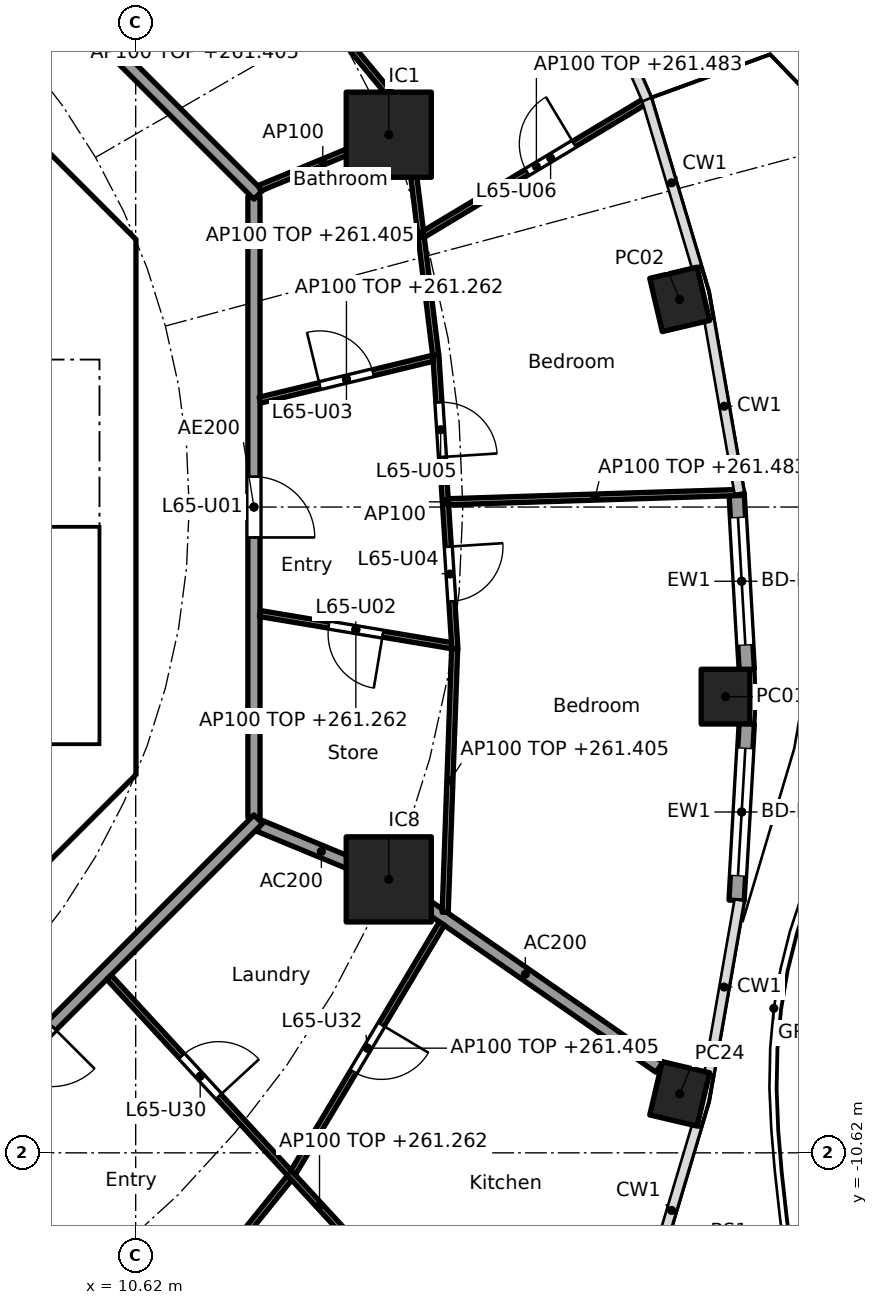
"""IFC4 building model, lengths in metres.
Left out: names, types, materials, properties, quantities, classifications, styles, units other than length and angle.
Written with IfcOpenShell. Run it as: python <this file> out.ifc"""

import sys

from ifc_helpers import new_model, si_unit, direction, frame, frame_2d, origin, origin_2d, place, context, subcontext, project, spatial, polyline, rectangle, hollow_rectangle, outline, extrude, element, fill, save


model = new_model("IFC4")
c1 = context("Model", 3, precision=1e-05, world=origin(), true_north=direction((0.0, 1.0)))
c2 = subcontext(c1, "Body", "Model", "MODEL_VIEW")
j1 = project(units=[si_unit("LENGTHUNIT", "METRE"), si_unit("PLANEANGLEUNIT", "RADIAN")], contexts=[c1])
p1 = place(None, origin())
s1 = spatial("IfcSite", under=j1, at=p1, CompositionType="ELEMENT")
p2 = place(p1, origin())
s2 = spatial("IfcBuilding", under=s1, at=p2, CompositionType="ELEMENT")
p3 = place(p2, frame((0.0, 0.0, 258.5)))
s3 = spatial("IfcBuildingStorey", under=s2, at=p3, CompositionType="ELEMENT", Elevation=258.5)
for number, where, z_axis, x_axis in (
    (1, (20.32, -3.118, -0.26), (0.0, 0.0, 1.0), (0.0, 1.0, 0.0)),
    (2, (19.566, 3.415, -0.26), (0.0, 0.0, 1.0), (-0.229, 0.973, 0.0)),
    (3, (19.566, -9.65, -0.26), (0.0, 0.0, 1.0), (0.229, 0.973, 0.0)),
):
    element("IfcColumn", number, at=place(p3, frame(where, z_axis=z_axis, x_axis=x_axis)), inside=s3, PredefinedType="COLUMN", context=c2, shape_type="SweptSolid", body=[
        extrude(hollow_rectangle(XDim=0.9, YDim=0.8, WallThickness=0.028, at=origin_2d()), origin(), (0.0, 0.0, 1.0), 3.96),
    ])
for number, where, z_axis, x_axis in (
    (4, (14.782, 6.123, 0.0), (0.0, 0.0, 1.0), (1.0, 0.0, 0.0)),
    (5, (14.782, -6.123, 0.0), (0.0, 0.0, 1.0), (1.0, 0.0, 0.0)),
):
    element("IfcColumn", number, at=place(p3, frame(where, z_axis=z_axis, x_axis=x_axis)), inside=s3, PredefinedType="COLUMN", context=c2, shape_type="SweptSolid", body=[
        extrude(rectangle(XDim=1.4, YDim=1.4, at=origin_2d()), origin(), (0.0, 0.0, 1.0), 3.7),
    ])
p4 = place(p3, frame((20.502, 0.235, 0.0), z_axis=(0.0, 0.0, 1.0), x_axis=(0.057533933376, -0.998343551344, 0.0)))
e6 = element("IfcWall", 6, at=p4, inside=s3, PredefinedType="SOLIDWALL", context=c2, shape_type="SweptSolid", body=[
    extrude(rectangle(XDim=2.915, YDim=0.25, at=frame_2d((1.458, 0.0))), origin(), (0.0, 0.0, 1.0), 3.44),
])
p5 = place(p4, frame((0.408, 0.0, 0.0)))
e7 = element("IfcOpeningElement", 7, at=p5, cuts=e6, PredefinedType="OPENING", context=c2, shape_type="SweptSolid", body=[
    extrude(rectangle(XDim=2.1, YDim=2.4, at=frame_2d((1.05, 1.2))), frame((0.0, 0.135, 0.0), z_axis=(0.0, -1.0, 0.0), x_axis=(1.0, 0.0, 0.0)), (0.0, 0.0, 1.0), 0.27),
])
p6 = place(p3, frame((20.669, -3.56, 0.0), z_axis=(0.0, 0.0, 1.0), x_axis=(-0.057533933376, -0.998343551344, 0.0)))
e8 = element("IfcWall", 8, at=p6, inside=s3, PredefinedType="SOLIDWALL", context=c2, shape_type="SweptSolid", body=[
    extrude(rectangle(XDim=2.915, YDim=0.25, at=frame_2d((1.458, 0.0))), origin(), (0.0, 0.0, 1.0), 3.44),
])
p7 = place(p6, frame((0.408, 0.0, 0.0)))
e9 = element("IfcOpeningElement", 9, at=p7, cuts=e8, PredefinedType="OPENING", context=c2, shape_type="SweptSolid", body=[
    extrude(rectangle(XDim=2.1, YDim=2.4, at=frame_2d((1.05, 1.2))), frame((0.0, 0.135, 0.0), z_axis=(0.0, -1.0, 0.0), x_axis=(1.0, 0.0, 0.0)), (0.0, 0.0, 1.0), 0.27),
])
p8 = place(p3, frame((9.988, 4.613, 0.0), z_axis=(0.0, 0.0, 1.0), x_axis=(-0.707106781187, 0.707106781187, 0.0)))
e10 = element("IfcWall", 10, at=p8, inside=s3, PredefinedType="SHEAR", context=c2, shape_type="SweptSolid", body=[
    extrude(rectangle(XDim=7.602, YDim=0.6, at=frame_2d((3.801, 0.0))), origin(), (0.0, 0.0, 1.0), 3.44),
])
p9 = place(p8, frame((3.201, 0.0, 0.0)))
e11 = element("IfcOpeningElement", 11, at=p9, cuts=e10, PredefinedType="OPENING", context=c2, shape_type="SweptSolid", body=[
    extrude(rectangle(XDim=1.2, YDim=2.1, at=frame_2d((0.6, 1.05))), frame((0.0, 0.31, 0.0), z_axis=(0.0, -1.0, 0.0), x_axis=(1.0, 0.0, 0.0)), (0.0, 0.0, 1.0), 0.62),
])
p10 = place(p3, frame((4.613, -9.988, 0.0), z_axis=(0.0, 0.0, 1.0), x_axis=(0.707106781187, 0.707106781187, 0.0)))
e12 = element("IfcWall", 12, at=p10, inside=s3, PredefinedType="SHEAR", context=c2, shape_type="SweptSolid", body=[
    extrude(rectangle(XDim=7.602, YDim=0.6, at=frame_2d((3.801, 0.0))), origin(), (0.0, 0.0, 1.0), 3.44),
])
p11 = place(p10, frame((3.201, 0.0, 0.0)))
e13 = element("IfcOpeningElement", 13, at=p11, cuts=e12, PredefinedType="OPENING", context=c2, shape_type="SweptSolid", body=[
    extrude(rectangle(XDim=1.2, YDim=2.1, at=frame_2d((0.6, 1.05))), frame((0.0, 0.31, 0.0), z_axis=(0.0, -1.0, 0.0), x_axis=(1.0, 0.0, 0.0)), (0.0, 0.0, 1.0), 0.62),
])
p12 = place(p3, frame((6.7, 4.0, 0.0), z_axis=(0.0, 0.0, 1.0), x_axis=(1.0, 0.0, 0.0)))
e14 = element("IfcWall", 14, at=p12, inside=s3, PredefinedType="SOLIDWALL", context=c2, shape_type="SweptSolid", body=[
    extrude(rectangle(XDim=3.325, YDim=0.2, at=frame_2d((1.662, 0.0))), origin(), (0.0, 0.0, 1.0), 3.44),
])
p13 = place(p12, frame((1.25, 0.0, 0.0)))
e15 = element("IfcOpeningElement", 15, at=p13, cuts=e14, PredefinedType="OPENING", context=c2, shape_type="SweptSolid", body=[
    extrude(rectangle(XDim=1.1, YDim=2.1, at=frame_2d((0.55, 1.05))), frame((0.0, 0.11, 0.0), z_axis=(0.0, -1.0, 0.0), x_axis=(1.0, 0.0, 0.0)), (0.0, 0.0, 1.0), 0.22),
])
p14 = place(p3, origin())
e16 = element("IfcWall", 16, at=p14, inside=s3, PredefinedType="SHEAR", context=c2, shape_type="SweptSolid", body=[
    extrude(outline(polyline([(9.776, -4.401), (10.025, -4.152), (10.025, -3.801), (10.025, 4.152), (9.776, 4.401), (10.2, 4.825), (10.625, 4.401), (10.625, -4.401), (10.2, -4.825), (9.776, -4.401)])), origin(), (0.0, 0.0, 1.0), 3.44),
])
p15 = place(p3, origin())
e17 = element("IfcWall", 17, at=p15, inside=s3, PredefinedType="SOLIDWALL", context=c2, shape_type="SweptSolid", body=[
    extrude(outline(polyline([(10.025, -4.1), (6.7, -4.1), (6.7, -3.9), (10.025, -3.9), (10.025, -4.1)])), origin(), (0.0, 0.0, 1.0), 3.44),
])
p16 = place(p3, frame((12.657, -5.243, 0.0), z_axis=(0.0, 0.0, 1.0), x_axis=(0.92383017907, -0.382802560388, 0.0)))
e18 = element("IfcWall", 18, at=p16, inside=s3, PredefinedType="PARTITIONING", context=c2, shape_type="SweptSolid", body=[
    extrude(rectangle(XDim=2.2, YDim=0.2, at=frame_2d((1.1, 0.0))), origin(), (0.0, 0.0, 1.0), 3.44),
])
p17 = place(p3, frame((14.823, -6.151, 0.0), z_axis=(0.0, 0.0, 1.0), x_axis=(0.821435065081, -0.570302054928, 0.0)))
e19 = element("IfcWall", 19, at=p17, inside=s3, PredefinedType="PARTITIONING", context=c2, shape_type="SweptSolid", body=[
    extrude(rectangle(XDim=5.368, YDim=0.2, at=frame_2d((2.684, 0.0))), origin(), (0.0, 0.0, 1.0), 3.44),
])
p18 = place(p3, frame((12.565, -5.104, 0.0), z_axis=(0.0, 0.0, 1.0), x_axis=(0.0, 1.0, 0.0)))
e20 = element("IfcWall", 20, at=p18, inside=s3, PredefinedType="PARTITIONING", context=c2, shape_type="SweptSolid", body=[
    extrude(rectangle(XDim=10.209, YDim=0.2, at=frame_2d((5.104, 0.0))), origin(), (0.0, 0.0, 1.0), 3.44),
])
p19 = place(p18, frame((4.604, 0.0, 0.0)))
e21 = element("IfcOpeningElement", 21, at=p19, cuts=e20, PredefinedType="OPENING", context=c2, shape_type="SweptSolid", body=[
    extrude(rectangle(XDim=1.0, YDim=2.1, at=frame_2d((0.5, 1.05))), frame((0.0, 0.11, 0.0), z_axis=(0.0, -1.0, 0.0), x_axis=(1.0, 0.0, 0.0)), (0.0, 0.0, 1.0), 0.22),
])
p20 = place(p3, frame((12.635, 5.134, 0.0), z_axis=(0.0, 0.0, 1.0), x_axis=(-0.707106781187, 0.707106781187, 0.0)))
e22 = element("IfcWall", 22, at=p20, inside=s3, PredefinedType="PARTITIONING", context=c2, shape_type="SweptSolid", body=[
    extrude(rectangle(XDim=10.609, YDim=0.2, at=frame_2d((5.305, 0.0))), origin(), (0.0, 0.0, 1.0), 3.44),
])
p21 = place(p3, frame((5.275, -12.494, 0.0), z_axis=(0.0, 0.0, 1.0), x_axis=(0.707106781187, 0.707106781187, 0.0)))
e23 = element("IfcWall", 23, at=p21, inside=s3, PredefinedType="PARTITIONING", context=c2, shape_type="SweptSolid", body=[
    extrude(rectangle(XDim=10.409, YDim=0.2, at=frame_2d((5.205, 0.0))), origin(), (0.0, 0.0, 1.0), 3.44),
])
p22 = place(p21, frame((4.604, 0.0, 0.0)))
e24 = element("IfcOpeningElement", 24, at=p22, cuts=e23, PredefinedType="OPENING", context=c2, shape_type="SweptSolid", body=[
    extrude(rectangle(XDim=1.0, YDim=2.1, at=frame_2d((0.5, 1.05))), frame((0.0, 0.11, 0.0), z_axis=(0.0, -1.0, 0.0), x_axis=(1.0, 0.0, 0.0)), (0.0, 0.0, 1.0), 0.22),
])
p23 = place(p3, frame((12.663, -1.751, 0.0), z_axis=(0.0, 0.0, 1.0), x_axis=(0.98626156497, -0.165191178529, 0.0)))
e25 = element("IfcWall", 25, at=p23, inside=s3, PredefinedType="PARTITIONING", context=c2, shape_type="SweptSolid", body=[
    extrude(rectangle(XDim=3.198, YDim=0.1, at=frame_2d((1.599, 0.0))), origin(), (0.0, 0.0, 1.0), 2.762),
])
p24 = place(p23, frame((1.149, 0.0, 0.0)))
e26 = element("IfcOpeningElement", 26, at=p24, cuts=e25, PredefinedType="OPENING", context=c2, shape_type="SweptSolid", body=[
    extrude(rectangle(XDim=0.9, YDim=2.1, at=frame_2d((0.45, 1.05))), frame((0.0, 0.06, 0.0), z_axis=(0.0, -1.0, 0.0), x_axis=(1.0, 0.0, 0.0)), (0.0, 0.0, 1.0), 0.12),
])
p25 = place(p3, frame((15.87, -2.338, 0.0), z_axis=(0.0, 0.0, 1.0), x_axis=(-0.064797294757, 0.997898447034, 0.0)))
e27 = element("IfcWall", 27, at=p25, inside=s3, PredefinedType="PARTITIONING", context=c2, shape_type="SweptSolid", body=[
    extrude(rectangle(XDim=4.857, YDim=0.1, at=frame_2d((2.428, 0.0))), origin(), (0.0, 0.0, 1.0), 3.44),
])
p26 = place(p25, frame((0.789, 0.0, 0.0)))
e28 = element("IfcOpeningElement", 28, at=p26, cuts=e27, PredefinedType="OPENING", context=c2, shape_type="SweptSolid", body=[
    extrude(rectangle(XDim=0.9, YDim=2.1, at=frame_2d((0.45, 1.05))), frame((0.0, 0.06, 0.0), z_axis=(0.0, -1.0, 0.0), x_axis=(1.0, 0.0, 0.0)), (0.0, 0.0, 1.0), 0.12),
])
p27 = place(p25, frame((3.167, 0.0, 0.0)))
e29 = element("IfcOpeningElement", 29, at=p27, cuts=e27, PredefinedType="OPENING", context=c2, shape_type="SweptSolid", body=[
    extrude(rectangle(XDim=0.9, YDim=2.1, at=frame_2d((0.45, 1.05))), frame((0.0, 0.06, 0.0), z_axis=(0.0, -1.0, 0.0), x_axis=(1.0, 0.0, 0.0)), (0.0, 0.0, 1.0), 0.12),
])
p28 = place(p3, frame((15.865, -2.338, 0.0), z_axis=(0.0, 0.0, 1.0), x_axis=(-0.035864509465, -0.999356661538, 0.0)))
e30 = element("IfcWall", 30, at=p28, inside=s3, PredefinedType="PARTITIONING", context=c2, shape_type="SweptSolid", body=[
    extrude(rectangle(XDim=4.329, YDim=0.1, at=frame_2d((2.165, 0.0))), origin(), (0.0, 0.0, 1.0), 2.905),
])
p29 = place(p3, frame((15.763, 0.087, 0.0), z_axis=(0.0, 0.0, 1.0), x_axis=(0.999492034598, 0.03186962151, 0.0)))
e31 = element("IfcWall", 31, at=p29, inside=s3, PredefinedType="PARTITIONING", context=c2, shape_type="SweptSolid", body=[
    extrude(rectangle(XDim=4.826, YDim=0.1, at=frame_2d((2.413, 0.0))), origin(), (0.0, 0.0, 1.0), 2.983),
])
p30 = place(p3, frame((12.662, 1.758, 0.0), z_axis=(0.0, 0.0, 1.0), x_axis=(0.972004827836, 0.234960879007, 0.0)))
e32 = element("IfcWall", 32, at=p30, inside=s3, PredefinedType="PARTITIONING", context=c2, shape_type="SweptSolid", body=[
    extrude(rectangle(XDim=2.93, YDim=0.1, at=frame_2d((1.465, 0.0))), origin(), (0.0, 0.0, 1.0), 2.762),
])
p31 = place(p30, frame((1.015, 0.0, 0.0)))
e33 = element("IfcOpeningElement", 33, at=p31, cuts=e32, PredefinedType="OPENING", context=c2, shape_type="SweptSolid", body=[
    extrude(rectangle(XDim=0.9, YDim=2.1, at=frame_2d((0.45, 1.05))), frame((0.0, 0.06, 0.0), z_axis=(0.0, -1.0, 0.0), x_axis=(1.0, 0.0, 0.0)), (0.0, 0.0, 1.0), 0.12),
])
p32 = place(p3, frame((15.552, 2.508, 0.0), z_axis=(0.0, 0.0, 1.0), x_axis=(-0.12196631785, 0.992534239868, 0.0)))
e34 = element("IfcWall", 34, at=p32, inside=s3, PredefinedType="PARTITIONING", context=c2, shape_type="SweptSolid", body=[
    extrude(rectangle(XDim=3.937, YDim=0.1, at=frame_2d((1.969, 0.0))), origin(), (0.0, 0.0, 1.0), 2.905),
])
p33 = place(p3, frame((15.355, 4.488, 0.0), z_axis=(0.0, 0.0, 1.0), x_axis=(0.85763237524, 0.514263268123, 0.0)))
e35 = element("IfcWall", 35, at=p33, inside=s3, PredefinedType="PARTITIONING", context=c2, shape_type="SweptSolid", body=[
    extrude(rectangle(XDim=4.324, YDim=0.1, at=frame_2d((2.162, 0.0))), origin(), (0.0, 0.0, 1.0), 2.983),
])
p34 = place(p33, frame((1.985, 0.0, 0.0)))
e36 = element("IfcOpeningElement", 36, at=p34, cuts=e35, PredefinedType="OPENING", context=c2, shape_type="SweptSolid", body=[
    extrude(rectangle(XDim=0.9, YDim=2.1, at=frame_2d((0.45, 1.05))), frame((0.0, 0.06, 0.0), z_axis=(0.0, -1.0, 0.0), x_axis=(1.0, 0.0, 0.0)), (0.0, 0.0, 1.0), 0.12),
])
p35 = place(p3, frame((12.657, 5.243, 0.0), z_axis=(0.0, 0.0, 1.0), x_axis=(0.923864733477, 0.382719158442, 0.0)))
e37 = element("IfcWall", 37, at=p35, inside=s3, PredefinedType="PARTITIONING", context=c2, shape_type="SweptSolid", body=[
    extrude(rectangle(XDim=2.25, YDim=0.1, at=frame_2d((1.125, 0.0))), origin(), (0.0, 0.0, 1.0), 3.44),
])
p36 = place(p3, frame((15.098, 6.427, 0.0), z_axis=(0.0, 0.0, 1.0), x_axis=(-0.637936555536, 0.770088924158, 0.0)))
e38 = element("IfcWall", 38, at=p36, inside=s3, PredefinedType="PARTITIONING", context=c2, shape_type="SweptSolid", body=[
    extrude(rectangle(XDim=6.46, YDim=0.1, at=frame_2d((3.23, 0.0))), origin(), (0.0, 0.0, 1.0), 2.905),
])
p37 = place(p36, frame((2.78, 0.0, 0.0)))
e39 = element("IfcOpeningElement", 39, at=p37, cuts=e38, PredefinedType="OPENING", context=c2, shape_type="SweptSolid", body=[
    extrude(rectangle(XDim=0.9, YDim=2.1, at=frame_2d((0.45, 1.05))), frame((0.0, 0.06, 0.0), z_axis=(0.0, -1.0, 0.0), x_axis=(1.0, 0.0, 0.0)), (0.0, 0.0, 1.0), 0.12),
])
p38 = place(p3, frame((7.708, -10.198, 0.0), z_axis=(0.0, 0.0, 1.0), x_axis=(0.503838537732, -0.863797851292, 0.0)))
e40 = element("IfcWall", 40, at=p38, inside=s3, PredefinedType="PARTITIONING", context=c2, shape_type="SweptSolid", body=[
    extrude(rectangle(XDim=5.14, YDim=0.1, at=frame_2d((2.57, 0.0))), origin(), (0.0, 0.0, 1.0), 2.762),
])
p39 = place(p38, frame((2.095, 0.0, 0.0)))
e41 = element("IfcOpeningElement", 41, at=p39, cuts=e40, PredefinedType="OPENING", context=c2, shape_type="SweptSolid", body=[
    extrude(rectangle(XDim=0.9, YDim=2.1, at=frame_2d((0.45, 1.05))), frame((0.0, 0.06, 0.0), z_axis=(0.0, -1.0, 0.0), x_axis=(1.0, 0.0, 0.0)), (0.0, 0.0, 1.0), 0.12),
])
p40 = place(p3, frame((10.304, -14.555, 0.0), z_axis=(0.0, 0.0, 1.0), x_axis=(0.628170338674, 0.778075848237, 0.0)))
e42 = element("IfcWall", 42, at=p40, inside=s3, PredefinedType="PARTITIONING", context=c2, shape_type="SweptSolid", body=[
    extrude(rectangle(XDim=4.532, YDim=0.1, at=frame_2d((2.266, 0.0))), origin(), (0.0, 0.0, 1.0), 2.905),
])
p41 = place(p40, frame((1.816, 0.0, 0.0)))
e43 = element("IfcOpeningElement", 43, at=p41, cuts=e42, PredefinedType="OPENING", context=c2, shape_type="SweptSolid", body=[
    extrude(rectangle(XDim=0.9, YDim=2.1, at=frame_2d((0.45, 1.05))), frame((0.0, 0.06, 0.0), z_axis=(0.0, -1.0, 0.0), x_axis=(1.0, 0.0, 0.0)), (0.0, 0.0, 1.0), 0.12),
])
p42 = place(p3, frame((10.179, -7.731, 0.0), z_axis=(0.0, 0.0, 1.0), x_axis=(0.67775318564, -0.73528947997, 0.0)))
e44 = element("IfcWall", 44, at=p42, inside=s3, PredefinedType="PARTITIONING", context=c2, shape_type="SweptSolid", body=[
    extrude(rectangle(XDim=10.222, YDim=0.1, at=frame_2d((5.111, 0.0))), origin(), (0.0, 0.0, 1.0), 2.762),
])
p43 = place(p42, frame((1.766, 0.0, 0.0)))
e45 = element("IfcOpeningElement", 45, at=p43, cuts=e44, PredefinedType="OPENING", context=c2, shape_type="SweptSolid", body=[
    extrude(rectangle(XDim=0.9, YDim=2.1, at=frame_2d((0.45, 1.05))), frame((0.0, 0.06, 0.0), z_axis=(0.0, -1.0, 0.0), x_axis=(1.0, 0.0, 0.0)), (0.0, 0.0, 1.0), 0.12),
])
p44 = place(p3, frame((13.208, -10.947, 0.0), z_axis=(0.0, 0.0, 1.0), x_axis=(0.512726452516, 0.858552028063, 0.0)))
e46 = element("IfcWall", 46, at=p44, inside=s3, PredefinedType="PARTITIONING", context=c2, shape_type="SweptSolid", body=[
    extrude(rectangle(XDim=4.772, YDim=0.1, at=frame_2d((2.386, 0.0))), origin(), (0.0, 0.0, 1.0), 2.905),
])
p45 = place(p44, frame((1.936, 0.0, 0.0)))
e47 = element("IfcOpeningElement", 47, at=p45, cuts=e46, PredefinedType="OPENING", context=c2, shape_type="SweptSolid", body=[
    extrude(rectangle(XDim=0.9, YDim=2.1, at=frame_2d((0.45, 1.05))), frame((0.0, 0.06, 0.0), z_axis=(0.0, -1.0, 0.0), x_axis=(1.0, 0.0, 0.0)), (0.0, 0.0, 1.0), 0.12),
])
p46 = place(p5, origin())
e48 = element("IfcDoor", 48, at=p46, inside=s3, OperationType="SLIDING_TO_LEFT", PredefinedType="DOOR", context=c2, shape_type="SweptSolid", body=[
    extrude(rectangle(XDim=2.1, YDim=2.4, at=frame_2d((1.05, 1.2))), frame((0.0, 0.025, 0.0), z_axis=(0.0, -1.0, 0.0), x_axis=(1.0, 0.0, 0.0)), (0.0, 0.0, 1.0), 0.05),
])
fill(e7, e48)
p47 = place(p7, origin())
e49 = element("IfcDoor", 49, at=p47, inside=s3, OperationType="SLIDING_TO_LEFT", PredefinedType="DOOR", context=c2, shape_type="SweptSolid", body=[
    extrude(rectangle(XDim=2.1, YDim=2.4, at=frame_2d((1.05, 1.2))), frame((0.0, 0.025, 0.0), z_axis=(0.0, -1.0, 0.0), x_axis=(1.0, 0.0, 0.0)), (0.0, 0.0, 1.0), 0.05),
])
fill(e9, e49)
p48 = place(p19, frame((1.0, 0.0, 0.0), x_axis=(-1.0, 0.0, 0.0)))
e50 = element("IfcDoor", 50, at=p48, inside=s3, OperationType="SINGLE_SWING_RIGHT", PredefinedType="DOOR", context=c2, shape_type="SweptSolid", body=[
    extrude(rectangle(XDim=1.0, YDim=2.1, at=frame_2d((0.5, 1.05))), frame((0.0, 0.025, 0.0), z_axis=(0.0, -1.0, 0.0), x_axis=(1.0, 0.0, 0.0)), (0.0, 0.0, 1.0), 0.05),
])
fill(e21, e50)
p49 = place(p24, frame((0.9, 0.0, 0.0), x_axis=(-1.0, 0.0, 0.0)))
e51 = element("IfcDoor", 51, at=p49, inside=s3, OperationType="SINGLE_SWING_LEFT", PredefinedType="DOOR", context=c2, shape_type="SweptSolid", body=[
    extrude(rectangle(XDim=0.9, YDim=2.1, at=frame_2d((0.45, 1.05))), frame((0.0, 0.025, 0.0), z_axis=(0.0, -1.0, 0.0), x_axis=(1.0, 0.0, 0.0)), (0.0, 0.0, 1.0), 0.05),
])
fill(e26, e51)
p50 = place(p31, origin())
e52 = element("IfcDoor", 52, at=p50, inside=s3, OperationType="SINGLE_SWING_LEFT", PredefinedType="DOOR", context=c2, shape_type="SweptSolid", body=[
    extrude(rectangle(XDim=0.9, YDim=2.1, at=frame_2d((0.45, 1.05))), frame((0.0, 0.025, 0.0), z_axis=(0.0, -1.0, 0.0), x_axis=(1.0, 0.0, 0.0)), (0.0, 0.0, 1.0), 0.05),
])
fill(e33, e52)
p51 = place(p26, frame((0.9, 0.0, 0.0), x_axis=(-1.0, 0.0, 0.0)))
e53 = element("IfcDoor", 53, at=p51, inside=s3, OperationType="SINGLE_SWING_LEFT", PredefinedType="DOOR", context=c2, shape_type="SweptSolid", body=[
    extrude(rectangle(XDim=0.9, YDim=2.1, at=frame_2d((0.45, 1.05))), frame((0.0, 0.025, 0.0), z_axis=(0.0, -1.0, 0.0), x_axis=(1.0, 0.0, 0.0)), (0.0, 0.0, 1.0), 0.05),
])
fill(e28, e53)
p52 = place(p27, frame((0.9, 0.0, 0.0), x_axis=(-1.0, 0.0, 0.0)))
e54 = element("IfcDoor", 54, at=p52, inside=s3, OperationType="SINGLE_SWING_RIGHT", PredefinedType="DOOR", context=c2, shape_type="SweptSolid", body=[
    extrude(rectangle(XDim=0.9, YDim=2.1, at=frame_2d((0.45, 1.05))), frame((0.0, 0.025, 0.0), z_axis=(0.0, -1.0, 0.0), x_axis=(1.0, 0.0, 0.0)), (0.0, 0.0, 1.0), 0.05),
])
fill(e29, e54)
p53 = place(p34, origin())
e55 = element("IfcDoor", 55, at=p53, inside=s3, OperationType="SINGLE_SWING_RIGHT", PredefinedType="DOOR", context=c2, shape_type="SweptSolid", body=[
    extrude(rectangle(XDim=0.9, YDim=2.1, at=frame_2d((0.45, 1.05))), frame((0.0, 0.025, 0.0), z_axis=(0.0, -1.0, 0.0), x_axis=(1.0, 0.0, 0.0)), (0.0, 0.0, 1.0), 0.05),
])
fill(e36, e55)
p54 = place(p22, frame((1.0, 0.0, 0.0), x_axis=(-1.0, 0.0, 0.0)))
e56 = element("IfcDoor", 56, at=p54, inside=s3, OperationType="SINGLE_SWING_LEFT", PredefinedType="DOOR", context=c2, shape_type="SweptSolid", body=[
    extrude(rectangle(XDim=1.0, YDim=2.1, at=frame_2d((0.5, 1.05))), frame((0.0, 0.025, 0.0), z_axis=(0.0, -1.0, 0.0), x_axis=(1.0, 0.0, 0.0)), (0.0, 0.0, 1.0), 0.05),
])
fill(e24, e56)
p55 = place(p43, origin())
e57 = element("IfcDoor", 57, at=p55, inside=s3, OperationType="SINGLE_SWING_RIGHT", PredefinedType="DOOR", context=c2, shape_type="SweptSolid", body=[
    extrude(rectangle(XDim=0.9, YDim=2.1, at=frame_2d((0.45, 1.05))), frame((0.0, 0.025, 0.0), z_axis=(0.0, -1.0, 0.0), x_axis=(1.0, 0.0, 0.0)), (0.0, 0.0, 1.0), 0.05),
])
fill(e45, e57)
p56 = place(p45, frame((0.9, 0.0, 0.0), x_axis=(-1.0, 0.0, 0.0)))
e58 = element("IfcDoor", 58, at=p56, inside=s3, OperationType="SINGLE_SWING_LEFT", PredefinedType="DOOR", context=c2, shape_type="SweptSolid", body=[
    extrude(rectangle(XDim=0.9, YDim=2.1, at=frame_2d((0.45, 1.05))), frame((0.0, 0.025, 0.0), z_axis=(0.0, -1.0, 0.0), x_axis=(1.0, 0.0, 0.0)), (0.0, 0.0, 1.0), 0.05),
])
fill(e47, e58)
save(model, sys.argv[1])
